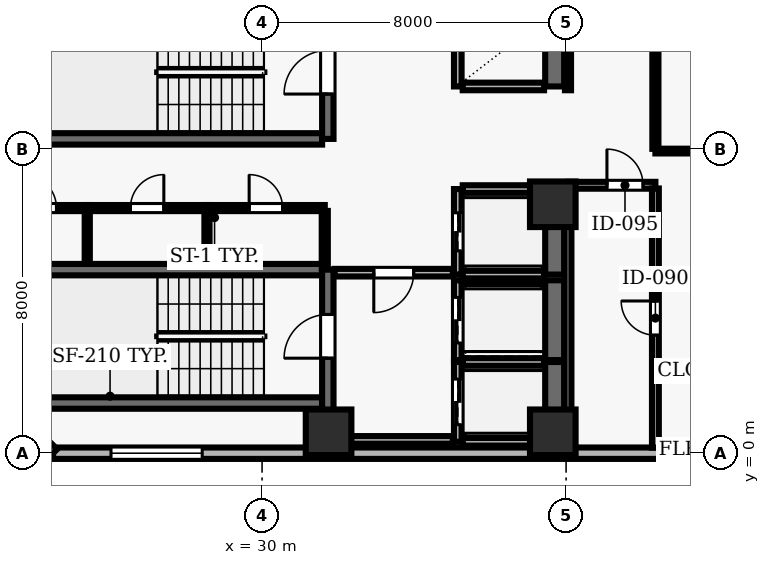
"""IFC4 building model, lengths in metres.
Left out: names, types, materials, properties, quantities, classifications, styles, units other than length and angle.
Written with IfcOpenShell. Run it as: python <this file> out.ifc"""

import sys

from ifc_helpers import new_model, si_unit, direction, frame, frame_2d, origin, origin_2d, place, context, subcontext, project, spatial, rectangle, extrude, element, fill, save


model = new_model("IFC4")
c1 = context("Model", 3, precision=1e-05, world=origin(), true_north=direction((0.0, 1.0)))
c2 = subcontext(c1, "Body", "Model", "MODEL_VIEW")
j1 = project(units=[si_unit("LENGTHUNIT", "METRE"), si_unit("PLANEANGLEUNIT", "RADIAN")], contexts=[c1])
p1 = place(None, origin())
s1 = spatial("IfcSite", under=j1, at=p1, CompositionType="ELEMENT")
p2 = place(p1, origin())
s2 = spatial("IfcBuilding", under=s1, at=p2, CompositionType="ELEMENT")
p3 = place(p2, frame((0.0, 0.0, 130.7)))
s3 = spatial("IfcBuildingStorey", under=s2, at=p3, CompositionType="ELEMENT", Elevation=130.7)
for number, where, z_axis, x_axis in (
    (1, (31.75, 0.55, 0.0), (0.0, 0.0, 1.0), (1.0, 0.0, 0.0)),
    (2, (37.65, 0.55, 0.0), (0.0, 0.0, 1.0), (1.0, 0.0, 0.0)),
    (3, (37.65, 6.55, 0.0), (0.0, 0.0, 1.0), (1.0, 0.0, 0.0)),
):
    element("IfcColumn", number, at=place(p3, frame(where, z_axis=z_axis, x_axis=x_axis)), inside=s3, PredefinedType="COLUMN", context=c2, shape_type="SweptSolid", body=[
        extrude(rectangle(XDim=1.2, YDim=1.2, at=origin_2d()), origin(), (0.0, 0.0, 1.0), 3.9),
    ])
p4 = place(p3, frame((24.5, 0.0, 0.0), z_axis=(0.0, 0.0, 1.0), x_axis=(1.0, 0.0, 0.0)))
e4 = element("IfcWall", 4, at=p4, inside=s3, PredefinedType="SOLIDWALL", context=c2, shape_type="SweptSolid", body=[
    extrude(rectangle(XDim=43.6, YDim=0.3, at=frame_2d((21.8, 0.0))), origin(), (0.0, 0.0, 1.0), 3.69),
])
p5 = place(p4, frame((1.525, 0.0, 0.9)))
e5 = element("IfcOpeningElement", 5, at=p5, cuts=e4, PredefinedType="OPENING", context=c2, shape_type="SweptSolid", body=[
    extrude(rectangle(XDim=2.4, YDim=1.8, at=frame_2d((1.2, 0.9))), frame((0.0, 0.16, 0.0), z_axis=(0.0, -1.0, 0.0), x_axis=(1.0, 0.0, 0.0)), (0.0, 0.0, 1.0), 0.32),
])
p6 = place(p4, frame((17.875, 0.0, 0.9)))
e6 = element("IfcOpeningElement", 6, at=p6, cuts=e4, PredefinedType="OPENING", context=c2, shape_type="SweptSolid", body=[
    extrude(rectangle(XDim=2.4, YDim=1.8, at=frame_2d((1.2, 0.9))), frame((0.0, 0.16, 0.0), z_axis=(0.0, -1.0, 0.0), x_axis=(1.0, 0.0, 0.0)), (0.0, 0.0, 1.0), 0.32),
])
p7 = place(p4, frame((24.225, 0.0, 0.9)))
e7 = element("IfcOpeningElement", 7, at=p7, cuts=e4, PredefinedType="OPENING", context=c2, shape_type="SweptSolid", body=[
    extrude(rectangle(XDim=2.4, YDim=1.8, at=frame_2d((1.2, 0.9))), frame((0.0, 0.16, 0.0), z_axis=(0.0, -1.0, 0.0), x_axis=(1.0, 0.0, 0.0)), (0.0, 0.0, 1.0), 0.32),
])
p8 = place(p4, frame((28.325, 0.0, 0.9)))
e8 = element("IfcOpeningElement", 8, at=p8, cuts=e4, PredefinedType="OPENING", context=c2, shape_type="SweptSolid", body=[
    extrude(rectangle(XDim=2.4, YDim=1.8, at=frame_2d((1.2, 0.9))), frame((0.0, 0.16, 0.0), z_axis=(0.0, -1.0, 0.0), x_axis=(1.0, 0.0, 0.0)), (0.0, 0.0, 1.0), 0.32),
])
p9 = place(p4, frame((34.225, 0.0, 0.9)))
e9 = element("IfcOpeningElement", 9, at=p9, cuts=e4, PredefinedType="OPENING", context=c2, shape_type="SweptSolid", body=[
    extrude(rectangle(XDim=2.4, YDim=1.8, at=frame_2d((1.2, 0.9))), frame((0.0, 0.16, 0.0), z_axis=(0.0, -1.0, 0.0), x_axis=(1.0, 0.0, 0.0)), (0.0, 0.0, 1.0), 0.32),
])
p10 = place(p4, frame((39.675, 0.0, 0.9)))
e10 = element("IfcOpeningElement", 10, at=p10, cuts=e4, PredefinedType="OPENING", context=c2, shape_type="SweptSolid", body=[
    extrude(rectangle(XDim=2.4, YDim=1.8, at=frame_2d((1.2, 0.9))), frame((0.0, 0.16, 0.0), z_axis=(0.0, -1.0, 0.0), x_axis=(1.0, 0.0, 0.0)), (0.0, 0.0, 1.0), 0.32),
])
p11 = place(p3, frame((22.0, 2.5, 0.0), z_axis=(0.0, 0.0, 1.0), x_axis=(0.707106781187, -0.707106781187, 0.0)))
e11 = element("IfcWall", 11, at=p11, inside=s3, PredefinedType="SOLIDWALL", context=c2, shape_type="SweptSolid", body=[
    extrude(rectangle(XDim=3.536, YDim=0.3, at=frame_2d((1.768, 0.0))), origin(), (0.0, 0.0, 1.0), 3.69),
])
for number, where, z_axis, x_axis in (
    (12, (31.58, 4.83, 0.0), (0.0, 0.0, 1.0), (-1.0, 0.0, 0.0)),
    (13, (23.22, 1.32, 0.0), (0.0, 0.0, 1.0), (1.0, 0.0, 0.0)),
):
    element("IfcWall", number, at=place(p3, frame(where, z_axis=z_axis, x_axis=x_axis)), inside=s3, PredefinedType="SHEAR", context=c2, shape_type="SweptSolid", body=[
        extrude(rectangle(XDim=8.36, YDim=0.3, at=frame_2d((4.18, 0.0))), origin(), (0.0, 0.0, 1.0), 3.69),
    ])
p12 = place(p3, frame((31.73, 0.96, 0.0), z_axis=(0.0, 0.0, 1.0), x_axis=(0.0, 1.0, 0.0)))
e14 = element("IfcWall", 14, at=p12, inside=s3, PredefinedType="SHEAR", context=c2, shape_type="SweptSolid", body=[
    extrude(rectangle(XDim=3.87, YDim=0.3, at=frame_2d((1.935, 0.0))), origin(), (0.0, 0.0, 1.0), 3.69),
])
p13 = place(p12, frame((1.54, 0.0, 0.0)))
e15 = element("IfcOpeningElement", 15, at=p13, cuts=e14, PredefinedType="OPENING", context=c2, shape_type="SweptSolid", body=[
    extrude(rectangle(XDim=1.15, YDim=2.15, at=frame_2d((0.575, 1.075))), frame((0.0, 0.16, 0.0), z_axis=(0.0, -1.0, 0.0), x_axis=(1.0, 0.0, 0.0)), (0.0, 0.0, 1.0), 0.32),
])
p14 = place(p3, frame((23.22, 8.27, 0.0), z_axis=(0.0, 0.0, 1.0), x_axis=(1.0, 0.0, 0.0)))
e16 = element("IfcWall", 16, at=p14, inside=s3, PredefinedType="SHEAR", context=c2, shape_type="SweptSolid", body=[
    extrude(rectangle(XDim=8.36, YDim=0.3, at=frame_2d((4.18, 0.0))), origin(), (0.0, 0.0, 1.0), 3.69),
])
p15 = place(p3, frame((31.73, 8.27, 0.0), z_axis=(0.0, 0.0, 1.0), x_axis=(0.0, 1.0, 0.0)))
e17 = element("IfcWall", 17, at=p15, inside=s3, PredefinedType="SHEAR", context=c2, shape_type="SweptSolid", body=[
    extrude(rectangle(XDim=3.51, YDim=0.3, at=frame_2d((1.755, 0.0))), origin(), (0.0, 0.0, 1.0), 3.69),
])
p16 = place(p15, frame((1.18, 0.0, 0.0)))
e18 = element("IfcOpeningElement", 18, at=p16, cuts=e17, PredefinedType="OPENING", context=c2, shape_type="SweptSolid", body=[
    extrude(rectangle(XDim=1.15, YDim=2.15, at=frame_2d((0.575, 1.075))), frame((0.0, 0.16, 0.0), z_axis=(0.0, -1.0, 0.0), x_axis=(1.0, 0.0, 0.0)), (0.0, 0.0, 1.0), 0.32),
])
p17 = place(p3, frame((35.15, 2.4, 0.0), z_axis=(0.0, 0.0, 1.0), x_axis=(0.0, -1.0, 0.0)))
e19 = element("IfcWall", 19, at=p17, inside=s3, PredefinedType="SOLIDWALL", context=c2, shape_type="SweptSolid", body=[
    extrude(rectangle(XDim=2.1, YDim=0.2, at=frame_2d((1.05, 0.0))), origin(), (0.0, 0.0, 1.0), 3.69),
])
p18 = place(p17, frame((0.45, 0.0, 0.0)))
e20 = element("IfcOpeningElement", 20, at=p18, cuts=e19, PredefinedType="OPENING", context=c2, shape_type="SweptSolid", body=[
    extrude(rectangle(XDim=1.2, YDim=2.15, at=frame_2d((0.6, 1.075))), frame((0.0, 0.11, 0.0), z_axis=(0.0, -1.0, 0.0), x_axis=(1.0, 0.0, 0.0)), (0.0, 0.0, 1.0), 0.22),
])
p19 = place(p3, frame((37.7, 0.3, 0.0), z_axis=(0.0, 0.0, 1.0), x_axis=(0.0, 1.0, 0.0)))
e21 = element("IfcWall", 21, at=p19, inside=s3, PredefinedType="SHEAR", context=c2, shape_type="SweptSolid", body=[
    extrude(rectangle(XDim=2.1, YDim=0.5, at=frame_2d((1.05, 0.0))), origin(), (0.0, 0.0, 1.0), 3.69),
])
for number, where, z_axis, x_axis in (
    (22, (35.28, 0.3, 0.0), (0.0, 0.0, 1.0), (1.0, 0.0, 0.0)),
    (23, (37.42, 2.4, 0.0), (0.0, 0.0, 1.0), (-1.0, 0.0, 0.0)),
):
    element("IfcWall", number, at=place(p3, frame(where, z_axis=z_axis, x_axis=x_axis)), inside=s3, PredefinedType="SOLIDWALL", context=c2, shape_type="SweptSolid", body=[
        extrude(rectangle(XDim=2.14, YDim=0.2, at=frame_2d((1.07, 0.0))), origin(), (0.0, 0.0, 1.0), 3.69),
    ])
p20 = place(p3, frame((35.15, 4.55, 0.0), z_axis=(0.0, 0.0, 1.0), x_axis=(0.0, -1.0, 0.0)))
e24 = element("IfcWall", 24, at=p20, inside=s3, PredefinedType="SOLIDWALL", context=c2, shape_type="SweptSolid", body=[
    extrude(rectangle(XDim=2.1, YDim=0.2, at=frame_2d((1.05, 0.0))), origin(), (0.0, 0.0, 1.0), 3.69),
])
p21 = place(p20, frame((0.45, 0.0, 0.0)))
e25 = element("IfcOpeningElement", 25, at=p21, cuts=e24, PredefinedType="OPENING", context=c2, shape_type="SweptSolid", body=[
    extrude(rectangle(XDim=1.2, YDim=2.15, at=frame_2d((0.6, 1.075))), frame((0.0, 0.11, 0.0), z_axis=(0.0, -1.0, 0.0), x_axis=(1.0, 0.0, 0.0)), (0.0, 0.0, 1.0), 0.22),
])
p22 = place(p3, frame((37.7, 2.45, 0.0), z_axis=(0.0, 0.0, 1.0), x_axis=(0.0, 1.0, 0.0)))
e26 = element("IfcWall", 26, at=p22, inside=s3, PredefinedType="SHEAR", context=c2, shape_type="SweptSolid", body=[
    extrude(rectangle(XDim=2.1, YDim=0.5, at=frame_2d((1.05, 0.0))), origin(), (0.0, 0.0, 1.0), 3.69),
])
p23 = place(p3, frame((37.42, 4.55, 0.0), z_axis=(0.0, 0.0, 1.0), x_axis=(-1.0, 0.0, 0.0)))
e27 = element("IfcWall", 27, at=p23, inside=s3, PredefinedType="SOLIDWALL", context=c2, shape_type="SweptSolid", body=[
    extrude(rectangle(XDim=2.14, YDim=0.2, at=frame_2d((1.07, 0.0))), origin(), (0.0, 0.0, 1.0), 3.69),
])
p24 = place(p3, frame((35.15, 6.95, 0.0), z_axis=(0.0, 0.0, 1.0), x_axis=(0.0, -1.0, 0.0)))
e28 = element("IfcWall", 28, at=p24, inside=s3, PredefinedType="SOLIDWALL", context=c2, shape_type="SweptSolid", body=[
    extrude(rectangle(XDim=2.25, YDim=0.2, at=frame_2d((1.125, 0.0))), origin(), (0.0, 0.0, 1.0), 3.69),
])
p25 = place(p24, frame((0.625, 0.0, 0.0)))
e29 = element("IfcOpeningElement", 29, at=p25, cuts=e28, PredefinedType="OPENING", context=c2, shape_type="SweptSolid", body=[
    extrude(rectangle(XDim=1.0, YDim=2.1, at=frame_2d((0.5, 1.05))), frame((0.0, 0.11, 0.0), z_axis=(0.0, -1.0, 0.0), x_axis=(1.0, 0.0, 0.0)), (0.0, 0.0, 1.0), 0.22),
])
p26 = place(p3, frame((37.7, 4.7, 0.0), z_axis=(0.0, 0.0, 1.0), x_axis=(0.0, 1.0, 0.0)))
e30 = element("IfcWall", 30, at=p26, inside=s3, PredefinedType="SHEAR", context=c2, shape_type="SweptSolid", body=[
    extrude(rectangle(XDim=2.25, YDim=0.5, at=frame_2d((1.125, 0.0))), origin(), (0.0, 0.0, 1.0), 3.69),
])
for number, where, z_axis, x_axis in (
    (31, (35.28, 4.7, 0.0), (0.0, 0.0, 1.0), (1.0, 0.0, 0.0)),
    (32, (37.42, 6.95, 0.0), (0.0, 0.0, 1.0), (-1.0, 0.0, 0.0)),
):
    element("IfcWall", number, at=place(p3, frame(where, z_axis=z_axis, x_axis=x_axis)), inside=s3, PredefinedType="SOLIDWALL", context=c2, shape_type="SweptSolid", body=[
        extrude(rectangle(XDim=2.14, YDim=0.2, at=frame_2d((1.07, 0.0))), origin(), (0.0, 0.0, 1.0), 3.69),
    ])
p27 = place(p3, frame((35.15, 11.55, 0.0), z_axis=(0.0, 0.0, 1.0), x_axis=(0.0, -1.0, 0.0)))
e33 = element("IfcWall", 33, at=p27, inside=s3, PredefinedType="SOLIDWALL", context=c2, shape_type="SweptSolid", body=[
    extrude(rectangle(XDim=1.9, YDim=0.2, at=frame_2d((0.95, 0.0))), origin(), (0.0, 0.0, 1.0), 3.69),
])
p28 = place(p3, frame((37.7, 9.65, 0.0), z_axis=(0.0, 0.0, 1.0), x_axis=(0.0, 1.0, 0.0)))
e34 = element("IfcWall", 34, at=p28, inside=s3, PredefinedType="SHEAR", context=c2, shape_type="SweptSolid", body=[
    extrude(rectangle(XDim=1.9, YDim=0.5, at=frame_2d((0.95, 0.0))), origin(), (0.0, 0.0, 1.0), 3.69),
])
p29 = place(p3, frame((35.28, 9.65, 0.0), z_axis=(0.0, 0.0, 1.0), x_axis=(1.0, 0.0, 0.0)))
e35 = element("IfcWall", 35, at=p29, inside=s3, PredefinedType="SOLIDWALL", context=c2, shape_type="SweptSolid", body=[
    extrude(rectangle(XDim=2.14, YDim=0.2, at=frame_2d((1.07, 0.0))), origin(), (0.0, 0.0, 1.0), 3.69),
])
p30 = place(p3, frame((22.2, 6.45, 0.0), z_axis=(0.0, 0.0, 1.0), x_axis=(1.0, 0.0, 0.0)))
e36 = element("IfcWall", 36, at=p30, inside=s3, PredefinedType="PARTITIONING", context=c2, shape_type="SweptSolid", body=[
    extrude(rectangle(XDim=3.2, YDim=0.16, at=frame_2d((1.6, 0.0))), origin(), (0.0, 0.0, 1.0), 3.69),
])
p31 = place(p30, frame((1.51, 0.0, 0.0)))
e37 = element("IfcOpeningElement", 37, at=p31, cuts=e36, PredefinedType="OPENING", context=c2, shape_type="SweptSolid", body=[
    extrude(rectangle(XDim=0.88, YDim=2.1, at=frame_2d((0.44, 1.05))), frame((0.0, 0.09, 0.0), z_axis=(0.0, -1.0, 0.0), x_axis=(1.0, 0.0, 0.0)), (0.0, 0.0, 1.0), 0.18),
])
p32 = place(p3, frame((25.4, 6.45, 0.0), z_axis=(0.0, 0.0, 1.0), x_axis=(1.0, 0.0, 0.0)))
e38 = element("IfcWall", 38, at=p32, inside=s3, PredefinedType="PARTITIONING", context=c2, shape_type="SweptSolid", body=[
    extrude(rectangle(XDim=3.15, YDim=0.16, at=frame_2d((1.575, 0.0))), origin(), (0.0, 0.0, 1.0), 3.69),
])
p33 = place(p32, frame((1.135, 0.0, 0.0)))
e39 = element("IfcOpeningElement", 39, at=p33, cuts=e38, PredefinedType="OPENING", context=c2, shape_type="SweptSolid", body=[
    extrude(rectangle(XDim=0.88, YDim=2.1, at=frame_2d((0.44, 1.05))), frame((0.0, 0.09, 0.0), z_axis=(0.0, -1.0, 0.0), x_axis=(1.0, 0.0, 0.0)), (0.0, 0.0, 1.0), 0.18),
])
p34 = place(p3, frame((28.55, 6.45, 0.0), z_axis=(0.0, 0.0, 1.0), x_axis=(1.0, 0.0, 0.0)))
e40 = element("IfcWall", 40, at=p34, inside=s3, PredefinedType="PARTITIONING", context=c2, shape_type="SweptSolid", body=[
    extrude(rectangle(XDim=3.1, YDim=0.16, at=frame_2d((1.55, 0.0))), origin(), (0.0, 0.0, 1.0), 3.69),
])
p35 = place(p34, frame((1.11, 0.0, 0.0)))
e41 = element("IfcOpeningElement", 41, at=p35, cuts=e40, PredefinedType="OPENING", context=c2, shape_type="SweptSolid", body=[
    extrude(rectangle(XDim=0.88, YDim=2.1, at=frame_2d((0.44, 1.05))), frame((0.0, 0.09, 0.0), z_axis=(0.0, -1.0, 0.0), x_axis=(1.0, 0.0, 0.0)), (0.0, 0.0, 1.0), 0.18),
])
p36 = place(p3, frame((31.65, 0.35, 0.0), z_axis=(0.0, 0.0, 1.0), x_axis=(1.0, 0.0, 0.0)))
e42 = element("IfcWall", 42, at=p36, inside=s3, PredefinedType="SOLIDWALL", context=c2, shape_type="SweptSolid", body=[
    extrude(rectangle(XDim=3.37, YDim=0.2, at=frame_2d((1.685, 0.0))), origin(), (0.0, 0.0, 1.0), 3.69),
])
p37 = place(p3, frame((35.02, 4.75, 0.0), z_axis=(0.0, 0.0, 1.0), x_axis=(-1.0, 0.0, 0.0)))
e43 = element("IfcWall", 43, at=p37, inside=s3, PredefinedType="SOLIDWALL", context=c2, shape_type="SweptSolid", body=[
    extrude(rectangle(XDim=3.11, YDim=0.2, at=frame_2d((1.555, 0.0))), origin(), (0.0, 0.0, 1.0), 3.69),
])
p38 = place(p37, frame((1.03, 0.0, 0.0)))
e44 = element("IfcOpeningElement", 44, at=p38, cuts=e43, PredefinedType="OPENING", context=c2, shape_type="SweptSolid", body=[
    extrude(rectangle(XDim=1.05, YDim=2.15, at=frame_2d((0.525, 1.075))), frame((0.0, 0.11, 0.0), z_axis=(0.0, -1.0, 0.0), x_axis=(1.0, 0.0, 0.0)), (0.0, 0.0, 1.0), 0.22),
])
p39 = place(p3, frame((38.05, 7.05, 0.0), z_axis=(0.0, 0.0, 1.0), x_axis=(1.0, 0.0, 0.0)))
e45 = element("IfcWall", 45, at=p39, inside=s3, PredefinedType="PARTITIONING", context=c2, shape_type="SweptSolid", body=[
    extrude(rectangle(XDim=2.3, YDim=0.18, at=frame_2d((1.15, 0.0))), origin(), (0.0, 0.0, 1.0), 3.69),
])
p40 = place(p39, frame((1.025, 0.0, 0.0)))
e46 = element("IfcOpeningElement", 46, at=p40, cuts=e45, PredefinedType="OPENING", context=c2, shape_type="SweptSolid", body=[
    extrude(rectangle(XDim=0.95, YDim=2.1, at=frame_2d((0.475, 1.05))), frame((0.0, 0.1, 0.0), z_axis=(0.0, -1.0, 0.0), x_axis=(1.0, 0.0, 0.0)), (0.0, 0.0, 1.0), 0.2),
])
p41 = place(p3, frame((47.91, 7.95, 0.0), z_axis=(0.0, 0.0, 1.0), x_axis=(-1.0, 0.0, 0.0)))
e47 = element("IfcWall", 47, at=p41, inside=s3, PredefinedType="PARTITIONING", context=c2, shape_type="SweptSolid", body=[
    extrude(rectangle(XDim=7.56, YDim=0.125, at=frame_2d((3.78, 0.0))), origin(), (0.0, 0.0, 1.0), 3.073),
])
for number, where, z_axis, x_axis in (
    (48, (25.4, 5.01, 0.0), (0.0, 0.0, 1.0), (0.0, 1.0, 0.0)),
    (49, (28.55, 5.01, 0.0), (0.0, 0.0, 1.0), (0.0, 1.0, 0.0)),
):
    element("IfcWall", number, at=place(p3, frame(where, z_axis=z_axis, x_axis=x_axis)), inside=s3, PredefinedType="PARTITIONING", context=c2, shape_type="SweptSolid", body=[
        extrude(rectangle(XDim=1.365, YDim=0.135, at=frame_2d((0.683, 0.0))), origin(), (0.0, 0.0, 1.0), 3.69),
    ])
p42 = place(p3, frame((31.65, 4.86, 0.0), z_axis=(0.0, 0.0, 1.0), x_axis=(0.0, 1.0, 0.0)))
e50 = element("IfcWall", 50, at=p42, inside=s3, PredefinedType="PARTITIONING", context=c2, shape_type="SweptSolid", body=[
    extrude(rectangle(XDim=1.515, YDim=0.16, at=frame_2d((0.757, 0.0))), origin(), (0.0, 0.0, 1.0), 3.69),
])
p43 = place(p3, frame((38.05, 6.965, 0.0), z_axis=(0.0, 0.0, 1.0), x_axis=(0.0, -1.0, 0.0)))
e51 = element("IfcWall", 51, at=p43, inside=s3, PredefinedType="PARTITIONING", context=c2, shape_type="SweptSolid", body=[
    extrude(rectangle(XDim=6.82, YDim=0.18, at=frame_2d((3.41, 0.0))), origin(), (0.0, 0.0, 1.0), 3.073),
])
p44 = place(p3, frame((38.05, 15.925, 0.0), z_axis=(0.0, 0.0, 1.0), x_axis=(0.0, -1.0, 0.0)))
e52 = element("IfcWall", 52, at=p44, inside=s3, PredefinedType="PARTITIONING", context=c2, shape_type="SweptSolid", body=[
    extrude(rectangle(XDim=6.375, YDim=0.16, at=frame_2d((3.188, 0.0))), origin(), (0.0, 0.0, 1.0), 3.073),
])
p45 = place(p3, frame((40.35, 0.145, 0.0), z_axis=(0.0, 0.0, 1.0), x_axis=(0.0, 1.0, 0.0)))
e53 = element("IfcWall", 53, at=p45, inside=s3, PredefinedType="PARTITIONING", context=c2, shape_type="SweptSolid", body=[
    extrude(rectangle(XDim=6.82, YDim=0.18, at=frame_2d((3.41, 0.0))), origin(), (0.0, 0.0, 1.0), 3.69),
])
p46 = place(p45, frame((2.96, 0.0, 0.0)))
e54 = element("IfcOpeningElement", 54, at=p46, cuts=e53, PredefinedType="OPENING", context=c2, shape_type="SweptSolid", body=[
    extrude(rectangle(XDim=0.9, YDim=2.1, at=frame_2d((0.45, 1.05))), frame((0.0, 0.1, 0.0), z_axis=(0.0, -1.0, 0.0), x_axis=(1.0, 0.0, 0.0)), (0.0, 0.0, 1.0), 0.2),
])
p47 = place(p3, frame((40.35, 8.008, 0.0), z_axis=(0.0, 0.0, 1.0), x_axis=(0.0, 1.0, 0.0)))
e55 = element("IfcWall", 55, at=p47, inside=s3, PredefinedType="PARTITIONING", context=c2, shape_type="SweptSolid", body=[
    extrude(rectangle(XDim=5.567, YDim=0.16, at=frame_2d((2.783, 0.0))), origin(), (0.0, 0.0, 1.0), 3.69),
])
p48 = place(p5, origin())
e56 = element("IfcWindow", 56, at=p48, inside=s3, PartitioningType="SINGLE_PANEL", PredefinedType="WINDOW", context=c2, shape_type="SweptSolid", body=[
    extrude(rectangle(XDim=2.4, YDim=1.8, at=frame_2d((1.2, 0.9))), frame((0.0, 0.03, 0.0), z_axis=(0.0, -1.0, 0.0), x_axis=(1.0, 0.0, 0.0)), (0.0, 0.0, 1.0), 0.06),
])
fill(e5, e56)
p49 = place(p13, origin())
e57 = element("IfcDoor", 57, at=p49, inside=s3, OperationType="SINGLE_SWING_LEFT", PredefinedType="DOOR", context=c2, shape_type="SweptSolid", body=[
    extrude(rectangle(XDim=1.15, YDim=2.15, at=frame_2d((0.575, 1.075))), frame((0.0, 0.025, 0.0), z_axis=(0.0, -1.0, 0.0), x_axis=(1.0, 0.0, 0.0)), (0.0, 0.0, 1.0), 0.05),
])
fill(e15, e57)
p50 = place(p16, origin())
e58 = element("IfcDoor", 58, at=p50, inside=s3, OperationType="SINGLE_SWING_LEFT", PredefinedType="DOOR", context=c2, shape_type="SweptSolid", body=[
    extrude(rectangle(XDim=1.15, YDim=2.15, at=frame_2d((0.575, 1.075))), frame((0.0, 0.025, 0.0), z_axis=(0.0, -1.0, 0.0), x_axis=(1.0, 0.0, 0.0)), (0.0, 0.0, 1.0), 0.05),
])
fill(e18, e58)
p51 = place(p18, origin())
e59 = element("IfcDoor", 59, at=p51, inside=s3, OperationType="DOUBLE_DOOR_SLIDING", PredefinedType="DOOR", context=c2, shape_type="SweptSolid", body=[
    extrude(rectangle(XDim=1.2, YDim=2.15, at=frame_2d((0.6, 1.075))), frame((0.0, 0.025, 0.0), z_axis=(0.0, -1.0, 0.0), x_axis=(1.0, 0.0, 0.0)), (0.0, 0.0, 1.0), 0.05),
])
fill(e20, e59)
p52 = place(p21, origin())
e60 = element("IfcDoor", 60, at=p52, inside=s3, OperationType="DOUBLE_DOOR_SLIDING", PredefinedType="DOOR", context=c2, shape_type="SweptSolid", body=[
    extrude(rectangle(XDim=1.2, YDim=2.15, at=frame_2d((0.6, 1.075))), frame((0.0, 0.025, 0.0), z_axis=(0.0, -1.0, 0.0), x_axis=(1.0, 0.0, 0.0)), (0.0, 0.0, 1.0), 0.05),
])
fill(e25, e60)
p53 = place(p25, origin())
e61 = element("IfcDoor", 61, at=p53, inside=s3, OperationType="DOUBLE_DOOR_SLIDING", PredefinedType="DOOR", context=c2, shape_type="SweptSolid", body=[
    extrude(rectangle(XDim=1.0, YDim=2.1, at=frame_2d((0.5, 1.05))), frame((0.0, 0.025, 0.0), z_axis=(0.0, -1.0, 0.0), x_axis=(1.0, 0.0, 0.0)), (0.0, 0.0, 1.0), 0.05),
])
fill(e29, e61)
p54 = place(p38, origin())
e62 = element("IfcDoor", 62, at=p54, inside=s3, OperationType="SINGLE_SWING_RIGHT", PredefinedType="DOOR", context=c2, shape_type="SweptSolid", body=[
    extrude(rectangle(XDim=1.05, YDim=2.15, at=frame_2d((0.525, 1.075))), frame((0.0, 0.025, 0.0), z_axis=(0.0, -1.0, 0.0), x_axis=(1.0, 0.0, 0.0)), (0.0, 0.0, 1.0), 0.05),
])
fill(e44, e62)
p55 = place(p31, origin())
e63 = element("IfcDoor", 63, at=p55, inside=s3, OperationType="SINGLE_SWING_LEFT", PredefinedType="DOOR", context=c2, shape_type="SweptSolid", body=[
    extrude(rectangle(XDim=0.88, YDim=2.1, at=frame_2d((0.44, 1.05))), frame((0.0, 0.025, 0.0), z_axis=(0.0, -1.0, 0.0), x_axis=(1.0, 0.0, 0.0)), (0.0, 0.0, 1.0), 0.05),
])
fill(e37, e63)
p56 = place(p33, origin())
e64 = element("IfcDoor", 64, at=p56, inside=s3, OperationType="SINGLE_SWING_RIGHT", PredefinedType="DOOR", context=c2, shape_type="SweptSolid", body=[
    extrude(rectangle(XDim=0.88, YDim=2.1, at=frame_2d((0.44, 1.05))), frame((0.0, 0.025, 0.0), z_axis=(0.0, -1.0, 0.0), x_axis=(1.0, 0.0, 0.0)), (0.0, 0.0, 1.0), 0.05),
])
fill(e39, e64)
p57 = place(p35, origin())
e65 = element("IfcDoor", 65, at=p57, inside=s3, OperationType="SINGLE_SWING_LEFT", PredefinedType="DOOR", context=c2, shape_type="SweptSolid", body=[
    extrude(rectangle(XDim=0.88, YDim=2.1, at=frame_2d((0.44, 1.05))), frame((0.0, 0.025, 0.0), z_axis=(0.0, -1.0, 0.0), x_axis=(1.0, 0.0, 0.0)), (0.0, 0.0, 1.0), 0.05),
])
fill(e41, e65)
p58 = place(p40, origin())
e66 = element("IfcDoor", 66, at=p58, inside=s3, OperationType="SINGLE_SWING_LEFT", PredefinedType="DOOR", context=c2, shape_type="SweptSolid", body=[
    extrude(rectangle(XDim=0.95, YDim=2.1, at=frame_2d((0.475, 1.05))), frame((0.0, 0.025, 0.0), z_axis=(0.0, -1.0, 0.0), x_axis=(1.0, 0.0, 0.0)), (0.0, 0.0, 1.0), 0.05),
])
fill(e46, e66)
p59 = place(p46, origin())
e67 = element("IfcDoor", 67, at=p59, inside=s3, OperationType="SINGLE_SWING_RIGHT", PredefinedType="DOOR", context=c2, shape_type="SweptSolid", body=[
    extrude(rectangle(XDim=0.9, YDim=2.1, at=frame_2d((0.45, 1.05))), frame((0.0, 0.025, 0.0), z_axis=(0.0, -1.0, 0.0), x_axis=(1.0, 0.0, 0.0)), (0.0, 0.0, 1.0), 0.05),
])
fill(e54, e67)
save(model, sys.argv[1])
